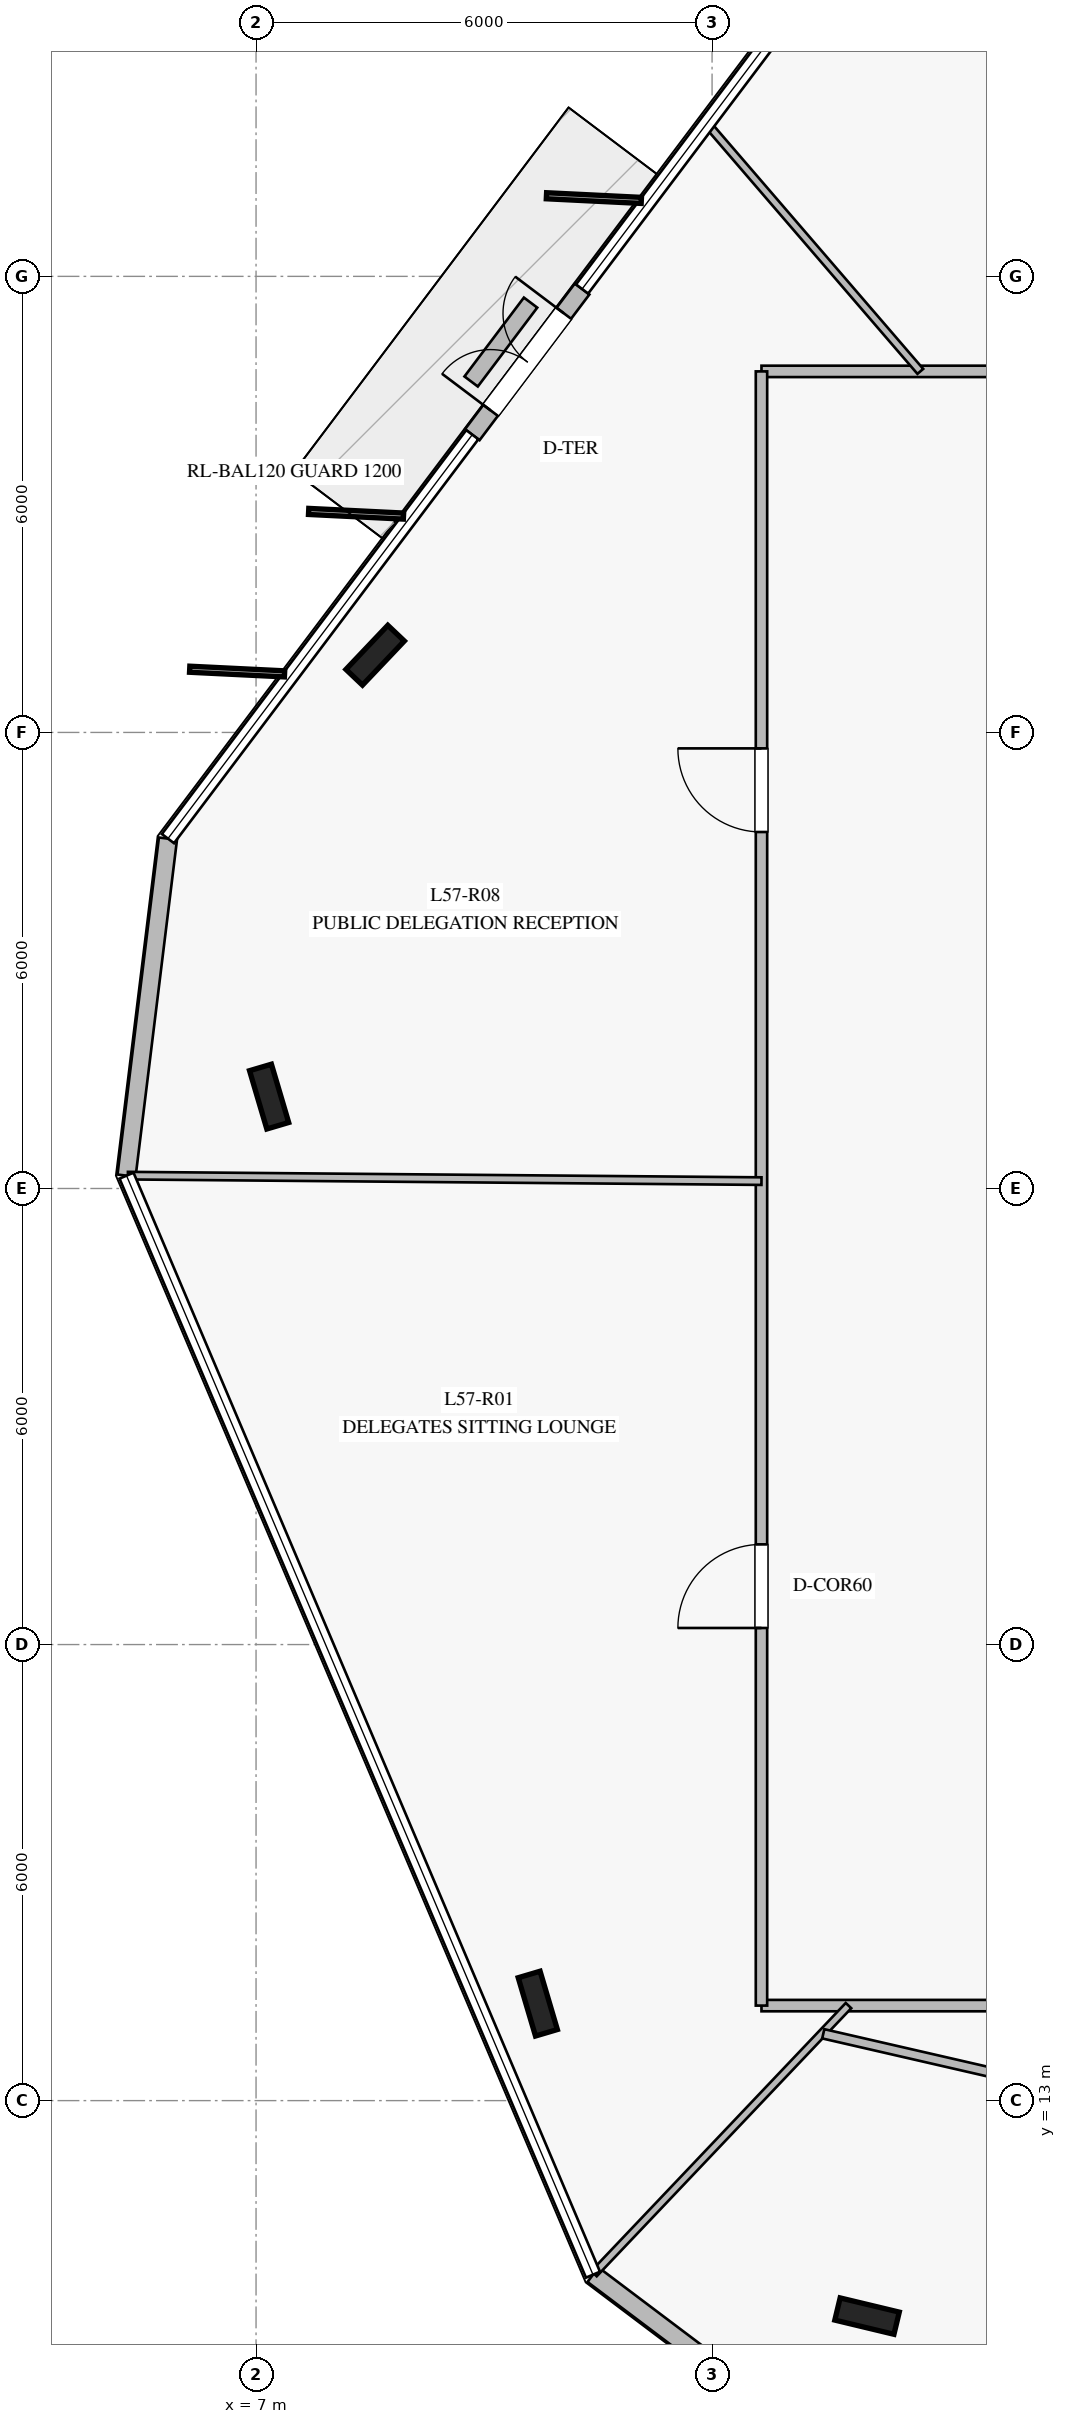
"""IFC4 building model, lengths in metres.
Left out: names, types, materials, properties, quantities, classifications, styles, units other than length and angle.
Written with IfcOpenShell. Run it as: python <this file> out.ifc"""

import sys

from ifc_helpers import new_model, si_unit, direction, frame, frame_2d, origin, origin_2d, place, context, subcontext, project, spatial, rectangle, i_section, extrude, element, fill, save


model = new_model("IFC4")
c1 = context("Model", 3, precision=1e-05, world=origin(), true_north=direction((0.0, 1.0)))
c2 = subcontext(c1, "Body", "Model", "MODEL_VIEW")
j1 = project(units=[si_unit("LENGTHUNIT", "METRE"), si_unit("PLANEANGLEUNIT", "RADIAN")], contexts=[c1])
p1 = place(None, origin())
s1 = spatial("IfcSite", under=j1, at=p1, CompositionType="ELEMENT")
p2 = place(p1, origin())
s2 = spatial("IfcBuilding", under=s1, at=p2, CompositionType="ELEMENT")
p3 = place(p2, frame((0.0, 0.0, 236.8)))
s3 = spatial("IfcBuildingStorey", under=s2, at=p3, CompositionType="ELEMENT", Elevation=236.8)
for number, where, z_axis, x_axis in (
    (1, (8.567, 32.016, 0.0), (0.0, 0.0, 1.0), (0.688, 0.725, 0.0)),
    (2, (7.172, 26.209, 0.0), (0.0, 0.0, 1.0), (-0.284, 0.959, 0.0)),
    (3, (10.707, 14.276, 0.0), (0.0, 0.0, 1.0), (-0.284, 0.959, 0.0)),
    (4, (15.039, 10.165, 0.0), (0.0, 0.0, 1.0), (-0.972, 0.233, 0.0)),
):
    element("IfcColumn", number, at=place(p3, frame(where, z_axis=z_axis, x_axis=x_axis)), inside=s3, PredefinedType="COLUMN", context=c2, shape_type="SweptSolid", body=[
        extrude(i_section(OverallWidth=0.3, OverallDepth=0.8, WebThickness=0.018, FlangeThickness=0.033, at=origin_2d()), origin(), (0.0, 0.0, 1.0), 4.0),
    ])
p4 = place(p3, frame((11.29, 36.834, 0.0), z_axis=(0.0, 0.0, 1.0), x_axis=(-0.601950815561, -0.798533165025, 0.0)))
e5 = element("IfcWall", 5, at=p4, inside=s3, PredefinedType="STANDARD", context=c2, shape_type="SweptSolid", body=[
    extrude(rectangle(XDim=2.401, YDim=0.24, at=frame_2d((1.2, 0.0))), origin(), (0.0, 0.0, 1.0), 3.78),
])
p5 = place(p4, frame((0.4, 0.0, 0.0)))
e6 = element("IfcOpeningElement", 6, at=p5, cuts=e5, PredefinedType="OPENING", context=c2, shape_type="SweptSolid", body=[
    extrude(rectangle(XDim=1.6, YDim=2.25, at=frame_2d((0.8, 1.125))), frame((0.0, 0.13, 0.0), z_axis=(0.0, -1.0, 0.0), x_axis=(1.0, 0.0, 0.0)), (0.0, 0.0, 1.0), 0.26),
])
p6 = place(p3, frame((5.841, 29.603, 0.0), z_axis=(0.0, 0.0, 1.0), x_axis=(-0.122030142036, -0.99252639483, 0.0)))
e7 = element("IfcWall", 7, at=p6, inside=s3, PredefinedType="STANDARD", context=c2, shape_type="SweptSolid", body=[
    extrude(rectangle(XDim=4.468, YDim=0.24, at=frame_2d((2.234, 0.0))), origin(), (0.0, 0.0, 1.0), 3.78),
])
p7 = place(p3, frame((11.433, 10.71, 0.0), z_axis=(0.0, 0.0, 1.0), x_axis=(0.798673666817, -0.601764384069, 0.0)))
e8 = element("IfcWall", 8, at=p7, inside=s3, PredefinedType="STANDARD", context=c2, shape_type="SweptSolid", body=[
    extrude(rectangle(XDim=4.469, YDim=0.24, at=frame_2d((2.234, 0.0))), origin(), (0.0, 0.0, 1.0), 3.78),
])
p8 = place(p3, frame((10.612, 36.655, 0.0), z_axis=(0.0, 0.0, 1.0), x_axis=(-0.601681803176, -0.798735881081, 0.0)))
e9 = element("IfcWall", 9, at=p8, inside=s3, PredefinedType="USERDEFINED", context=c2, shape_type="SweptSolid", body=[
    extrude(rectangle(XDim=1.3, YDim=0.22, at=frame_2d((0.65, 0.0))), origin(), (0.0, 0.0, 1.0), 0.4),
])
p9 = place(p3, frame((13.65, 35.75, 0.0), z_axis=(0.0, 0.0, 1.0), x_axis=(1.0, 0.0, 0.0)))
e10 = element("IfcWall", 10, at=p9, inside=s3, PredefinedType="PARTITIONING", context=c2, shape_type="SweptSolid", body=[
    extrude(rectangle(XDim=22.7, YDim=0.15, at=frame_2d((11.35, 0.0))), origin(), (0.0, 0.0, 1.0), 3.05),
])
p10 = place(p9, frame((16.956, 0.0, 0.0)))
e11 = element("IfcOpeningElement", 11, at=p10, cuts=e10, PredefinedType="OPENING", context=c2, shape_type="SweptSolid", body=[
    extrude(rectangle(XDim=1.1, YDim=2.2, at=frame_2d((0.55, 1.1))), frame((0.0, 0.085, 0.0), z_axis=(0.0, -1.0, 0.0), x_axis=(1.0, 0.0, 0.0)), (0.0, 0.0, 1.0), 0.17),
])
p11 = place(p9, frame((6.796, 0.0, 0.0)))
e12 = element("IfcOpeningElement", 12, at=p11, cuts=e10, PredefinedType="OPENING", context=c2, shape_type="SweptSolid", body=[
    extrude(rectangle(XDim=1.1, YDim=2.2, at=frame_2d((0.55, 1.1))), frame((0.0, 0.085, 0.0), z_axis=(0.0, -1.0, 0.0), x_axis=(1.0, 0.0, 0.0)), (0.0, 0.0, 1.0), 0.17),
])
p12 = place(p3, frame((36.35, 14.25, 0.0), z_axis=(0.0, 0.0, 1.0), x_axis=(-1.0, 0.0, 0.0)))
e13 = element("IfcWall", 13, at=p12, inside=s3, PredefinedType="PARTITIONING", context=c2, shape_type="SweptSolid", body=[
    extrude(rectangle(XDim=22.7, YDim=0.15, at=frame_2d((11.35, 0.0))), origin(), (0.0, 0.0, 1.0), 3.02),
])
p13 = place(p12, frame((14.348, 0.0, 0.0)))
e14 = element("IfcOpeningElement", 14, at=p13, cuts=e13, PredefinedType="OPENING", context=c2, shape_type="SweptSolid", body=[
    extrude(rectangle(XDim=1.1, YDim=2.2, at=frame_2d((0.55, 1.1))), frame((0.0, 0.085, 0.0), z_axis=(0.0, -1.0, 0.0), x_axis=(1.0, 0.0, 0.0)), (0.0, 0.0, 1.0), 0.17),
])
p14 = place(p3, frame((13.65, 14.25, 0.0), z_axis=(0.0, 0.0, 1.0), x_axis=(0.0, 1.0, 0.0)))
e15 = element("IfcWall", 15, at=p14, inside=s3, PredefinedType="PARTITIONING", context=c2, shape_type="SweptSolid", body=[
    extrude(rectangle(XDim=21.5, YDim=0.15, at=frame_2d((10.75, 0.0))), origin(), (0.0, 0.0, 1.0), 3.28),
])
p15 = place(p14, frame((4.968, 0.0, 0.0)))
e16 = element("IfcOpeningElement", 16, at=p15, cuts=e15, PredefinedType="OPENING", context=c2, shape_type="SweptSolid", body=[
    extrude(rectangle(XDim=1.1, YDim=2.2, at=frame_2d((0.55, 1.1))), frame((0.0, 0.085, 0.0), z_axis=(0.0, -1.0, 0.0), x_axis=(1.0, 0.0, 0.0)), (0.0, 0.0, 1.0), 0.17),
])
p16 = place(p14, frame((15.44, 0.0, 0.0)))
e17 = element("IfcOpeningElement", 17, at=p16, cuts=e15, PredefinedType="OPENING", context=c2, shape_type="SweptSolid", body=[
    extrude(rectangle(XDim=1.1, YDim=2.2, at=frame_2d((0.55, 1.1))), frame((0.0, 0.085, 0.0), z_axis=(0.0, -1.0, 0.0), x_axis=(1.0, 0.0, 0.0)), (0.0, 0.0, 1.0), 0.17),
])
p17 = place(p3, frame((15.74, 35.75, 0.0), z_axis=(0.0, 0.0, 1.0), x_axis=(-0.652566727063, 0.75773126287, 0.0)))
e18 = element("IfcWall", 18, at=p17, inside=s3, PredefinedType="MOVABLE", context=c2, shape_type="SweptSolid", body=[
    extrude(rectangle(XDim=4.288, YDim=0.1, at=frame_2d((2.144, 0.0))), origin(), (0.0, 0.0, 1.0), 3.18),
])
p18 = place(p3, frame((13.65, 25.097, 0.0), z_axis=(0.0, 0.0, 1.0), x_axis=(-0.999962678342, 0.008639555708, 0.0)))
e19 = element("IfcWall", 19, at=p18, inside=s3, PredefinedType="MOVABLE", context=c2, shape_type="SweptSolid", body=[
    extrude(rectangle(XDim=8.336, YDim=0.1, at=frame_2d((4.168, 0.0))), origin(), (0.0, 0.0, 1.0), 3.18),
])
p19 = place(p3, frame((14.795, 14.25, 0.0), z_axis=(0.0, 0.0, 1.0), x_axis=(-0.688547593197, -0.725191155422, 0.0)))
e20 = element("IfcWall", 20, at=p19, inside=s3, PredefinedType="MOVABLE", context=c2, shape_type="SweptSolid", body=[
    extrude(rectangle(XDim=4.864, YDim=0.1, at=frame_2d((2.432, 0.0))), origin(), (0.0, 0.0, 1.0), 3.18),
])
p20 = place(p3, frame((14.463, 13.879, 0.0), z_axis=(0.0, 0.0, 1.0), x_axis=(0.974546244814, -0.224186566768, 0.0)))
e21 = element("IfcWall", 21, at=p20, inside=s3, PredefinedType="PARTITIONING", context=c2, shape_type="SweptSolid", body=[
    extrude(rectangle(XDim=15.21, YDim=0.125, at=frame_2d((7.605, 0.0))), origin(), (0.0, 0.0, 1.0), 3.25),
])
p21 = place(p20, frame((7.105, 0.0, 0.0)))
e22 = element("IfcOpeningElement", 22, at=p21, cuts=e21, PredefinedType="OPENING", context=c2, shape_type="SweptSolid", body=[
    extrude(rectangle(XDim=1.0, YDim=2.15, at=frame_2d((0.5, 1.075))), frame((0.0, 0.073, 0.0), z_axis=(0.0, -1.0, 0.0), x_axis=(1.0, 0.0, 0.0)), (0.0, 0.0, 1.0), 0.145),
])
p22 = place(p5, frame((1.6, 0.0, 0.0), z_axis=(0.0, 0.0, 1.0), x_axis=(-1.0, 0.0, 0.0)))
e23 = element("IfcDoor", 23, at=p22, inside=s3, OperationType="DOUBLE_DOOR_SINGLE_SWING", PredefinedType="DOOR", context=c2, shape_type="SweptSolid", body=[
    extrude(rectangle(XDim=1.6, YDim=2.25, at=frame_2d((0.8, 1.125))), frame((0.0, 0.025, 0.0), z_axis=(0.0, -1.0, 0.0), x_axis=(1.0, 0.0, 0.0)), (0.0, 0.0, 1.0), 0.05),
])
fill(e6, e23)
p23 = place(p15, origin())
e24 = element("IfcDoor", 24, at=p23, inside=s3, OperationType="SINGLE_SWING_LEFT", PredefinedType="DOOR", context=c2, shape_type="SweptSolid", body=[
    extrude(rectangle(XDim=1.1, YDim=2.2, at=frame_2d((0.55, 1.1))), frame((0.0, 0.025, 0.0), z_axis=(0.0, -1.0, 0.0), x_axis=(1.0, 0.0, 0.0)), (0.0, 0.0, 1.0), 0.05),
])
fill(e16, e24)
p24 = place(p16, origin())
e25 = element("IfcDoor", 25, at=p24, inside=s3, OperationType="SINGLE_SWING_RIGHT", PredefinedType="DOOR", context=c2, shape_type="SweptSolid", body=[
    extrude(rectangle(XDim=1.1, YDim=2.2, at=frame_2d((0.55, 1.1))), frame((0.0, 0.025, 0.0), z_axis=(0.0, -1.0, 0.0), x_axis=(1.0, 0.0, 0.0)), (0.0, 0.0, 1.0), 0.05),
])
fill(e17, e25)
save(model, sys.argv[1])
